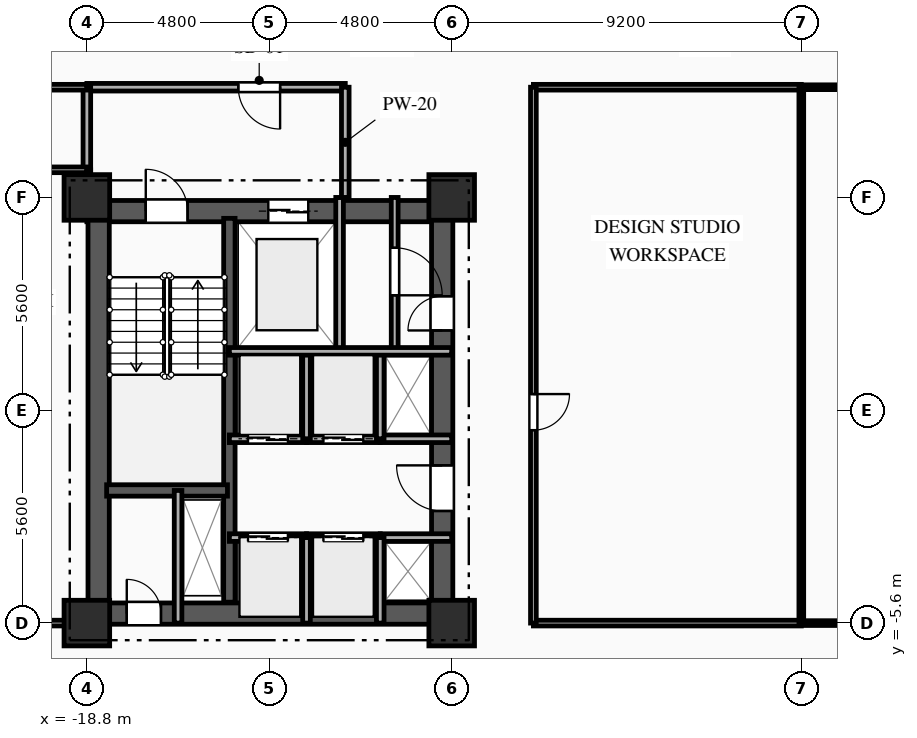
"""IFC4 building model, lengths in metres.
Left out: names, types, materials, properties, quantities, classifications, styles, units other than length and angle.
Written with IfcOpenShell. Run it as: python <this file> out.ifc"""

import sys

from ifc_helpers import new_model, si_unit, direction, frame, frame_2d, origin, origin_2d, place, context, subcontext, project, spatial, rectangle, extrude, element, fill, save


model = new_model("IFC4")
c1 = context("Model", 3, precision=1e-05, world=origin(), true_north=direction((0.0, 1.0)))
c2 = subcontext(c1, "Body", "Model", "MODEL_VIEW")
j1 = project(units=[si_unit("LENGTHUNIT", "METRE"), si_unit("PLANEANGLEUNIT", "RADIAN")], contexts=[c1])
p1 = place(None, origin())
s1 = spatial("IfcSite", under=j1, at=p1, CompositionType="ELEMENT")
p2 = place(p1, origin())
s2 = spatial("IfcBuilding", under=s1, at=p2, CompositionType="ELEMENT")
p3 = place(p2, frame((0.0, 0.0, 67.2)))
s3 = spatial("IfcBuildingStorey", under=s2, at=p3, CompositionType="ELEMENT", Elevation=67.2)
for number, where, z_axis, x_axis in (
    (1, (-18.8, -5.6, 0.0), (0.0, 0.0, 1.0), (1.0, 0.0, 0.0)),
    (2, (-18.8, 5.6, 0.0), (0.0, 0.0, 1.0), (1.0, 0.0, 0.0)),
    (3, (-9.2, -5.6, 0.0), (0.0, 0.0, 1.0), (1.0, 0.0, 0.0)),
    (4, (-9.2, 5.6, 0.0), (0.0, 0.0, 1.0), (1.0, 0.0, 0.0)),
):
    element("IfcColumn", number, at=place(p3, frame(where, z_axis=z_axis, x_axis=x_axis)), inside=s3, PredefinedType="COLUMN", context=c2, shape_type="SweptSolid", body=[
        extrude(rectangle(XDim=1.2, YDim=1.2, at=origin_2d()), origin(), (0.0, 0.0, 1.0), 3.35),
    ])
p4 = place(p3, frame((-18.8, 5.24, 0.0), z_axis=(0.0, 0.0, 1.0), x_axis=(1.0, 0.0, 0.0)))
e5 = element("IfcWall", 5, at=p4, inside=s3, PredefinedType="SHEAR", context=c2, shape_type="SweptSolid", body=[
    extrude(rectangle(XDim=9.6, YDim=0.56, at=frame_2d((4.8, 0.0))), origin(), (0.0, 0.0, 1.0), 3.035),
])
p5 = place(p4, frame((1.55, 0.0, 0.0)))
e6 = element("IfcOpeningElement", 6, at=p5, cuts=e5, PredefinedType="OPENING", context=c2, shape_type="SweptSolid", body=[
    extrude(rectangle(XDim=1.1, YDim=2.15, at=frame_2d((0.55, 1.075))), frame((0.0, 0.29, 0.0), z_axis=(0.0, -1.0, 0.0), x_axis=(1.0, 0.0, 0.0)), (0.0, 0.0, 1.0), 0.58),
])
p6 = place(p4, frame((4.775, 0.0, 0.0)))
e7 = element("IfcOpeningElement", 7, at=p6, cuts=e5, PredefinedType="OPENING", context=c2, shape_type="SweptSolid", body=[
    extrude(rectangle(XDim=1.05, YDim=2.1, at=frame_2d((0.525, 1.05))), frame((0.0, 0.29, 0.0), z_axis=(0.0, -1.0, 0.0), x_axis=(1.0, 0.0, 0.0)), (0.0, 0.0, 1.0), 0.58),
])
p7 = place(p3, frame((-18.8, -5.35, 0.0), z_axis=(0.0, 0.0, 1.0), x_axis=(1.0, 0.0, 0.0)))
e8 = element("IfcWall", 8, at=p7, inside=s3, PredefinedType="SHEAR", context=c2, shape_type="SweptSolid", body=[
    extrude(rectangle(XDim=9.6, YDim=0.56, at=frame_2d((4.8, 0.0))), origin(), (0.0, 0.0, 1.0), 3.035),
])
p8 = place(p7, frame((1.05, 0.0, 0.0)))
e9 = element("IfcOpeningElement", 9, at=p8, cuts=e8, PredefinedType="OPENING", context=c2, shape_type="SweptSolid", body=[
    extrude(rectangle(XDim=0.9, YDim=2.1, at=frame_2d((0.45, 1.05))), frame((0.0, 0.29, 0.0), z_axis=(0.0, -1.0, 0.0), x_axis=(1.0, 0.0, 0.0)), (0.0, 0.0, 1.0), 0.58),
])
p9 = place(p3, frame((-18.49, -5.05, 0.0), z_axis=(0.0, 0.0, 1.0), x_axis=(0.0, 1.0, 0.0)))
e10 = element("IfcWall", 10, at=p9, inside=s3, PredefinedType="SHEAR", context=c2, shape_type="SweptSolid", body=[
    extrude(rectangle(XDim=10.1, YDim=0.56, at=frame_2d((5.05, 0.0))), origin(), (0.0, 0.0, 1.0), 3.035),
])
p10 = place(p3, frame((-9.45, -5.05, 0.0), z_axis=(0.0, 0.0, 1.0), x_axis=(0.0, 1.0, 0.0)))
e11 = element("IfcWall", 11, at=p10, inside=s3, PredefinedType="SHEAR", context=c2, shape_type="SweptSolid", body=[
    extrude(rectangle(XDim=10.1, YDim=0.56, at=frame_2d((5.05, 0.0))), origin(), (0.0, 0.0, 1.0), 3.035),
])
p11 = place(p10, frame((7.15, 0.0, 0.0)))
e12 = element("IfcOpeningElement", 12, at=p11, cuts=e11, PredefinedType="OPENING", context=c2, shape_type="SweptSolid", body=[
    extrude(rectangle(XDim=0.9, YDim=2.1, at=frame_2d((0.45, 1.05))), frame((0.0, 0.29, 0.0), z_axis=(0.0, -1.0, 0.0), x_axis=(1.0, 0.0, 0.0)), (0.0, 0.0, 1.0), 0.58),
])
p12 = place(p10, frame((2.4, 0.0, 0.0)))
e13 = element("IfcOpeningElement", 13, at=p12, cuts=e11, PredefinedType="OPENING", context=c2, shape_type="SweptSolid", body=[
    extrude(rectangle(XDim=1.2, YDim=2.15, at=frame_2d((0.6, 1.075))), frame((0.0, 0.29, 0.0), z_axis=(0.0, -1.0, 0.0), x_axis=(1.0, 0.0, 0.0)), (0.0, 0.0, 1.0), 0.58),
])
p13 = place(p3, frame((-15.05, -5.05, 0.0), z_axis=(0.0, 0.0, 1.0), x_axis=(0.0, 1.0, 0.0)))
e14 = element("IfcWall", 14, at=p13, inside=s3, PredefinedType="SHEAR", context=c2, shape_type="SweptSolid", body=[
    extrude(rectangle(XDim=10.1, YDim=0.3, at=frame_2d((5.05, 0.0))), origin(), (0.0, 0.0, 1.0), 3.035),
])
p14 = place(p3, frame((-18.28, -2.11, 0.0), z_axis=(0.0, 0.0, 1.0), x_axis=(1.0, 0.0, 0.0)))
e15 = element("IfcWall", 15, at=p14, inside=s3, PredefinedType="SHEAR", context=c2, shape_type="SweptSolid", body=[
    extrude(rectangle(XDim=3.18, YDim=0.3, at=frame_2d((1.59, 0.0))), origin(), (0.0, 0.0, 1.0), 3.035),
])
p15 = place(p3, frame((-16.4, -5.6, 0.0), z_axis=(0.0, 0.0, 1.0), x_axis=(0.0, 1.0, 0.0)))
e16 = element("IfcWall", 16, at=p15, inside=s3, PredefinedType="PARTITIONING", context=c2, shape_type="SweptSolid", body=[
    extrude(rectangle(XDim=3.49, YDim=0.2, at=frame_2d((1.745, 0.0))), origin(), (0.0, 0.0, 1.0), 3.035),
])
p16 = place(p3, frame((-12.15, 1.55, 0.0), z_axis=(0.0, 0.0, 1.0), x_axis=(0.0, 1.0, 0.0)))
e17 = element("IfcWall", 17, at=p16, inside=s3, PredefinedType="PARTITIONING", context=c2, shape_type="SweptSolid", body=[
    extrude(rectangle(XDim=4.05, YDim=0.2, at=frame_2d((2.025, 0.0))), origin(), (0.0, 0.0, 1.0), 3.035),
])
p17 = place(p3, frame((-12.0, 8.5, 0.0), z_axis=(0.0, 0.0, 1.0), x_axis=(-1.0, 0.0, 0.0)))
e18 = element("IfcWall", 18, at=p17, inside=s3, PredefinedType="PARTITIONING", context=c2, shape_type="SweptSolid", body=[
    extrude(rectangle(XDim=6.8, YDim=0.2, at=frame_2d((3.4, 0.0))), origin(), (0.0, 0.0, 1.0), 3.035),
])
p18 = place(p17, frame((1.715, 0.0, 0.0)))
e19 = element("IfcOpeningElement", 19, at=p18, cuts=e18, PredefinedType="OPENING", context=c2, shape_type="SweptSolid", body=[
    extrude(rectangle(XDim=1.1, YDim=2.15, at=frame_2d((0.55, 1.075))), frame((0.0, 0.11, 0.0), z_axis=(0.0, -1.0, 0.0), x_axis=(1.0, 0.0, 0.0)), (0.0, 0.0, 1.0), 0.22),
])
p19 = place(p3, frame((-12.0, 5.6, 0.0), z_axis=(0.0, 0.0, 1.0), x_axis=(0.0, 1.0, 0.0)))
e20 = element("IfcWall", 20, at=p19, inside=s3, PredefinedType="PARTITIONING", context=c2, shape_type="SweptSolid", body=[
    extrude(rectangle(XDim=2.9, YDim=0.2, at=frame_2d((1.45, 0.0))), origin(), (0.0, 0.0, 1.0), 3.035),
])
p20 = place(p3, frame((-18.8, 6.327, 0.0), z_axis=(0.0, 0.0, 1.0), x_axis=(0.0, -1.0, 0.0)))
e21 = element("IfcWall", 21, at=p20, inside=s3, PredefinedType="PARTITIONING", context=c2, shape_type="SweptSolid", body=[
    extrude(rectangle(XDim=0.727, YDim=0.2, at=frame_2d((0.363, 0.0))), origin(), (0.0, 0.0, 1.0), 2.52),
])
p21 = place(p3, frame((-18.8, 8.5, 0.0), z_axis=(0.0, 0.0, 1.0), x_axis=(0.0, -1.0, 0.0)))
e22 = element("IfcWall", 22, at=p21, inside=s3, PredefinedType="PARTITIONING", context=c2, shape_type="SweptSolid", body=[
    extrude(rectangle(XDim=2.173, YDim=0.2, at=frame_2d((1.086, 0.0))), origin(), (0.0, 0.0, 1.0), 2.52),
])
p22 = place(p3, frame((-10.7, 5.6, 0.0), z_axis=(0.0, 0.0, 1.0), x_axis=(0.0, -1.0, 0.0)))
e23 = element("IfcWall", 23, at=p22, inside=s3, PredefinedType="PARTITIONING", context=c2, shape_type="SweptSolid", body=[
    extrude(rectangle(XDim=4.05, YDim=0.18, at=frame_2d((2.025, 0.0))), origin(), (0.0, 0.0, 1.0), 3.035),
])
p23 = place(p22, frame((1.325, 0.0, 0.0)))
e24 = element("IfcOpeningElement", 24, at=p23, cuts=e23, PredefinedType="OPENING", context=c2, shape_type="SweptSolid", body=[
    extrude(rectangle(XDim=1.25, YDim=2.2, at=frame_2d((0.625, 1.1))), frame((0.0, 0.1, 0.0), z_axis=(0.0, -1.0, 0.0), x_axis=(1.0, 0.0, 0.0)), (0.0, 0.0, 1.0), 0.2),
])
p24 = place(p3, frame((-15.05, -3.35, 0.0), z_axis=(0.0, 0.0, 1.0), x_axis=(1.0, 0.0, 0.0)))
e25 = element("IfcWall", 25, at=p24, inside=s3, PredefinedType="PARTITIONING", context=c2, shape_type="SweptSolid", body=[
    extrude(rectangle(XDim=2.03, YDim=0.2, at=frame_2d((1.015, 0.0))), origin(), (0.0, 0.0, 1.0), 3.035),
])
p25 = place(p24, frame((0.49, 0.0, 0.0)))
e26 = element("IfcOpeningElement", 26, at=p25, cuts=e25, PredefinedType="OPENING", context=c2, shape_type="SweptSolid", body=[
    extrude(rectangle(XDim=1.05, YDim=2.1, at=frame_2d((0.525, 1.05))), frame((0.0, 0.11, 0.0), z_axis=(0.0, -1.0, 0.0), x_axis=(1.0, 0.0, 0.0)), (0.0, 0.0, 1.0), 0.22),
])
p26 = place(p3, frame((-13.02, -3.35, 0.0), z_axis=(0.0, 0.0, 1.0), x_axis=(1.0, 0.0, 0.0)))
e27 = element("IfcWall", 27, at=p26, inside=s3, PredefinedType="PARTITIONING", context=c2, shape_type="SweptSolid", body=[
    extrude(rectangle(XDim=1.94, YDim=0.2, at=frame_2d((0.97, 0.0))), origin(), (0.0, 0.0, 1.0), 3.035),
])
p27 = place(p26, frame((0.445, 0.0, 0.0)))
e28 = element("IfcOpeningElement", 28, at=p27, cuts=e27, PredefinedType="OPENING", context=c2, shape_type="SweptSolid", body=[
    extrude(rectangle(XDim=1.05, YDim=2.1, at=frame_2d((0.525, 1.05))), frame((0.0, 0.11, 0.0), z_axis=(0.0, -1.0, 0.0), x_axis=(1.0, 0.0, 0.0)), (0.0, 0.0, 1.0), 0.22),
])
p28 = place(p3, frame((-11.08, -3.35, 0.0), z_axis=(0.0, 0.0, 1.0), x_axis=(1.0, 0.0, 0.0)))
e29 = element("IfcWall", 29, at=p28, inside=s3, PredefinedType="PARTITIONING", context=c2, shape_type="SweptSolid", body=[
    extrude(rectangle(XDim=1.88, YDim=0.2, at=frame_2d((0.94, 0.0))), origin(), (0.0, 0.0, 1.0), 2.75),
])
p29 = place(p3, frame((-13.02, -0.75, 0.0), z_axis=(0.0, 0.0, 1.0), x_axis=(-1.0, 0.0, 0.0)))
e30 = element("IfcWall", 30, at=p29, inside=s3, PredefinedType="PARTITIONING", context=c2, shape_type="SweptSolid", body=[
    extrude(rectangle(XDim=2.03, YDim=0.2, at=frame_2d((1.015, 0.0))), origin(), (0.0, 0.0, 1.0), 3.035),
])
p30 = place(p29, frame((0.49, 0.0, 0.0)))
e31 = element("IfcOpeningElement", 31, at=p30, cuts=e30, PredefinedType="OPENING", context=c2, shape_type="SweptSolid", body=[
    extrude(rectangle(XDim=1.05, YDim=2.1, at=frame_2d((0.525, 1.05))), frame((0.0, 0.11, 0.0), z_axis=(0.0, -1.0, 0.0), x_axis=(1.0, 0.0, 0.0)), (0.0, 0.0, 1.0), 0.22),
])
p31 = place(p3, frame((-11.08, -0.75, 0.0), z_axis=(0.0, 0.0, 1.0), x_axis=(-1.0, 0.0, 0.0)))
e32 = element("IfcWall", 32, at=p31, inside=s3, PredefinedType="PARTITIONING", context=c2, shape_type="SweptSolid", body=[
    extrude(rectangle(XDim=1.94, YDim=0.2, at=frame_2d((0.97, 0.0))), origin(), (0.0, 0.0, 1.0), 3.035),
])
p32 = place(p31, frame((0.445, 0.0, 0.0)))
e33 = element("IfcOpeningElement", 33, at=p32, cuts=e32, PredefinedType="OPENING", context=c2, shape_type="SweptSolid", body=[
    extrude(rectangle(XDim=1.05, YDim=2.1, at=frame_2d((0.525, 1.05))), frame((0.0, 0.11, 0.0), z_axis=(0.0, -1.0, 0.0), x_axis=(1.0, 0.0, 0.0)), (0.0, 0.0, 1.0), 0.22),
])
p33 = place(p3, frame((-9.2, -0.75, 0.0), z_axis=(0.0, 0.0, 1.0), x_axis=(-1.0, 0.0, 0.0)))
e34 = element("IfcWall", 34, at=p33, inside=s3, PredefinedType="PARTITIONING", context=c2, shape_type="SweptSolid", body=[
    extrude(rectangle(XDim=1.88, YDim=0.2, at=frame_2d((0.94, 0.0))), origin(), (0.0, 0.0, 1.0), 3.035),
])
for number, where, z_axis, x_axis in (
    (35, (-13.02, -5.6, 0.0), (0.0, 0.0, 1.0), (0.0, 1.0, 0.0)),
    (36, (-11.08, -5.6, 0.0), (0.0, 0.0, 1.0), (0.0, 1.0, 0.0)),
):
    element("IfcWall", number, at=place(p3, frame(where, z_axis=z_axis, x_axis=x_axis)), inside=s3, PredefinedType="PARTITIONING", context=c2, shape_type="SweptSolid", body=[
        extrude(rectangle(XDim=2.25, YDim=0.2, at=frame_2d((1.125, 0.0))), origin(), (0.0, 0.0, 1.0), 3.035),
    ])
for number, where, z_axis, x_axis in (
    (37, (-13.02, -0.75, 0.0), (0.0, 0.0, 1.0), (0.0, 1.0, 0.0)),
    (38, (-11.08, -0.75, 0.0), (0.0, 0.0, 1.0), (0.0, 1.0, 0.0)),
):
    element("IfcWall", number, at=place(p3, frame(where, z_axis=z_axis, x_axis=x_axis)), inside=s3, PredefinedType="PARTITIONING", context=c2, shape_type="SweptSolid", body=[
        extrude(rectangle(XDim=2.3, YDim=0.2, at=frame_2d((1.15, 0.0))), origin(), (0.0, 0.0, 1.0), 3.035),
    ])
p34 = place(p3, frame((-18.8, 8.5, 0.0), z_axis=(0.0, 0.0, 1.0), x_axis=(-1.0, 0.0, 0.0)))
e39 = element("IfcWall", 39, at=p34, inside=s3, PredefinedType="PARTITIONING", context=c2, shape_type="SweptSolid", body=[
    extrude(rectangle(XDim=4.2, YDim=0.15, at=frame_2d((2.1, 0.0))), origin(), (0.0, 0.0, 1.0), 3.035),
])
p35 = place(p34, frame((2.321, 0.0, 0.0)))
e40 = element("IfcOpeningElement", 40, at=p35, cuts=e39, PredefinedType="OPENING", context=c2, shape_type="SweptSolid", body=[
    extrude(rectangle(XDim=1.05, YDim=2.15, at=frame_2d((0.525, 1.075))), frame((0.0, 0.085, 0.0), z_axis=(0.0, -1.0, 0.0), x_axis=(1.0, 0.0, 0.0)), (0.0, 0.0, 1.0), 0.17),
])
p36 = place(p3, frame((0.0, 8.5, 0.0), z_axis=(0.0, 0.0, 1.0), x_axis=(-1.0, 0.0, 0.0)))
e41 = element("IfcWall", 41, at=p36, inside=s3, PredefinedType="PARTITIONING", context=c2, shape_type="SweptSolid", body=[
    extrude(rectangle(XDim=7.05, YDim=0.15, at=frame_2d((3.525, 0.0))), origin(), (0.0, 0.0, 1.0), 3.035),
])
p37 = place(p3, frame((7.05, 8.5, 0.0), z_axis=(0.0, 0.0, 1.0), x_axis=(-1.0, 0.0, 0.0)))
e42 = element("IfcWall", 42, at=p37, inside=s3, PredefinedType="PARTITIONING", context=c2, shape_type="SweptSolid", body=[
    extrude(rectangle(XDim=7.05, YDim=0.125, at=frame_2d((3.525, 0.0))), origin(), (0.0, 0.0, 1.0), 3.035),
])
p38 = place(p3, frame((-23.0, -5.6, 0.0), z_axis=(0.0, 0.0, 1.0), x_axis=(1.0, 0.0, 0.0)))
e43 = element("IfcWall", 43, at=p38, inside=s3, PredefinedType="PARTITIONING", context=c2, shape_type="SweptSolid", body=[
    extrude(rectangle(XDim=4.2, YDim=0.15, at=frame_2d((2.1, 0.0))), origin(), (0.0, 0.0, 1.0), 3.035),
])
p39 = place(p38, frame((0.829, 0.0, 0.0)))
e44 = element("IfcOpeningElement", 44, at=p39, cuts=e43, PredefinedType="OPENING", context=c2, shape_type="SweptSolid", body=[
    extrude(rectangle(XDim=1.05, YDim=2.15, at=frame_2d((0.525, 1.075))), frame((0.0, 0.085, 0.0), z_axis=(0.0, -1.0, 0.0), x_axis=(1.0, 0.0, 0.0)), (0.0, 0.0, 1.0), 0.17),
])
p40 = place(p3, frame((-7.05, -5.6, 0.0), z_axis=(0.0, 0.0, 1.0), x_axis=(1.0, 0.0, 0.0)))
e45 = element("IfcWall", 45, at=p40, inside=s3, PredefinedType="PARTITIONING", context=c2, shape_type="SweptSolid", body=[
    extrude(rectangle(XDim=7.05, YDim=0.15, at=frame_2d((3.525, 0.0))), origin(), (0.0, 0.0, 1.0), 2.52),
])
p41 = place(p3, frame((0.0, -5.6, 0.0), z_axis=(0.0, 0.0, 1.0), x_axis=(1.0, 0.0, 0.0)))
e46 = element("IfcWall", 46, at=p41, inside=s3, PredefinedType="PARTITIONING", context=c2, shape_type="SweptSolid", body=[
    extrude(rectangle(XDim=7.05, YDim=0.125, at=frame_2d((3.525, 0.0))), origin(), (0.0, 0.0, 1.0), 2.52),
])
p42 = place(p3, frame((-7.05, 8.5, 0.0), z_axis=(0.0, 0.0, 1.0), x_axis=(0.0, -1.0, 0.0)))
e47 = element("IfcWall", 47, at=p42, inside=s3, PredefinedType="PARTITIONING", context=c2, shape_type="SweptSolid", body=[
    extrude(rectangle(XDim=14.1, YDim=0.15, at=frame_2d((7.05, 0.0))), origin(), (0.0, 0.0, 1.0), 3.035),
])
p43 = place(p42, frame((8.074, 0.0, 0.0)))
e48 = element("IfcOpeningElement", 48, at=p43, cuts=e47, PredefinedType="OPENING", context=c2, shape_type="SweptSolid", body=[
    extrude(rectangle(XDim=0.95, YDim=2.1, at=frame_2d((0.475, 1.05))), frame((0.0, 0.085, 0.0), z_axis=(0.0, -1.0, 0.0), x_axis=(1.0, 0.0, 0.0)), (0.0, 0.0, 1.0), 0.17),
])
p44 = place(p3, frame((-25.59, 6.327, 0.0), z_axis=(0.0, 0.0, 1.0), x_axis=(1.0, 0.0, 0.0)))
e49 = element("IfcWall", 49, at=p44, inside=s3, PredefinedType="PARTITIONING", context=c2, shape_type="SweptSolid", body=[
    extrude(rectangle(XDim=6.79, YDim=0.15, at=frame_2d((3.395, 0.0))), origin(), (0.0, 0.0, 1.0), 3.035),
])
p45 = place(p3, frame((0.0, 8.5, 0.0), z_axis=(0.0, 0.0, 1.0), x_axis=(0.0, -1.0, 0.0)))
e50 = element("IfcWall", 50, at=p45, inside=s3, PredefinedType="PARTITIONING", context=c2, shape_type="SweptSolid", body=[
    extrude(rectangle(XDim=14.1, YDim=0.125, at=frame_2d((7.05, 0.0))), origin(), (0.0, 0.0, 1.0), 3.035),
])
p46 = place(p3, frame((-15.05, 1.55, 0.0), z_axis=(0.0, 0.0, 1.0), x_axis=(1.0, 0.0, 0.0)))
e51 = element("IfcWall", 51, at=p46, inside=s3, PredefinedType="PARTITIONING", context=c2, shape_type="SweptSolid", body=[
    extrude(rectangle(XDim=5.85, YDim=0.2, at=frame_2d((2.925, 0.0))), origin(), (0.0, 0.0, 1.0), 3.035),
])
p47 = place(p5, origin())
e52 = element("IfcDoor", 52, at=p47, inside=s3, OperationType="SINGLE_SWING_LEFT", PredefinedType="DOOR", context=c2, shape_type="SweptSolid", body=[
    extrude(rectangle(XDim=1.1, YDim=2.15, at=frame_2d((0.55, 1.075))), frame((0.0, 0.025, 0.0), z_axis=(0.0, -1.0, 0.0), x_axis=(1.0, 0.0, 0.0)), (0.0, 0.0, 1.0), 0.05),
])
fill(e6, e52)
p48 = place(p6, origin())
e53 = element("IfcDoor", 53, at=p48, inside=s3, OperationType="DOUBLE_DOOR_SLIDING", PredefinedType="DOOR", context=c2, shape_type="SweptSolid", body=[
    extrude(rectangle(XDim=1.05, YDim=2.1, at=frame_2d((0.525, 1.05))), frame((0.0, 0.025, 0.0), z_axis=(0.0, -1.0, 0.0), x_axis=(1.0, 0.0, 0.0)), (0.0, 0.0, 1.0), 0.05),
])
fill(e7, e53)
p49 = place(p8, origin())
e54 = element("IfcDoor", 54, at=p49, inside=s3, OperationType="SINGLE_SWING_LEFT", PredefinedType="DOOR", context=c2, shape_type="SweptSolid", body=[
    extrude(rectangle(XDim=0.9, YDim=2.1, at=frame_2d((0.45, 1.05))), frame((0.0, 0.025, 0.0), z_axis=(0.0, -1.0, 0.0), x_axis=(1.0, 0.0, 0.0)), (0.0, 0.0, 1.0), 0.05),
])
fill(e9, e54)
p50 = place(p18, origin())
e55 = element("IfcDoor", 55, at=p50, inside=s3, OperationType="SINGLE_SWING_LEFT", PredefinedType="DOOR", context=c2, shape_type="SweptSolid", body=[
    extrude(rectangle(XDim=1.1, YDim=2.15, at=frame_2d((0.55, 1.075))), frame((0.0, 0.025, 0.0), z_axis=(0.0, -1.0, 0.0), x_axis=(1.0, 0.0, 0.0)), (0.0, 0.0, 1.0), 0.05),
])
fill(e19, e55)
p51 = place(p23, origin())
e56 = element("IfcDoor", 56, at=p51, inside=s3, OperationType="SINGLE_SWING_RIGHT", PredefinedType="DOOR", context=c2, shape_type="SweptSolid", body=[
    extrude(rectangle(XDim=1.25, YDim=2.2, at=frame_2d((0.625, 1.1))), frame((0.0, 0.025, 0.0), z_axis=(0.0, -1.0, 0.0), x_axis=(1.0, 0.0, 0.0)), (0.0, 0.0, 1.0), 0.05),
])
fill(e24, e56)
p52 = place(p11, origin())
e57 = element("IfcDoor", 57, at=p52, inside=s3, OperationType="SINGLE_SWING_LEFT", PredefinedType="DOOR", context=c2, shape_type="SweptSolid", body=[
    extrude(rectangle(XDim=0.9, YDim=2.1, at=frame_2d((0.45, 1.05))), frame((0.0, 0.025, 0.0), z_axis=(0.0, -1.0, 0.0), x_axis=(1.0, 0.0, 0.0)), (0.0, 0.0, 1.0), 0.05),
])
fill(e12, e57)
p53 = place(p25, origin())
e58 = element("IfcDoor", 58, at=p53, inside=s3, OperationType="DOUBLE_DOOR_SLIDING", PredefinedType="DOOR", context=c2, shape_type="SweptSolid", body=[
    extrude(rectangle(XDim=1.05, YDim=2.1, at=frame_2d((0.525, 1.05))), frame((0.0, 0.025, 0.0), z_axis=(0.0, -1.0, 0.0), x_axis=(1.0, 0.0, 0.0)), (0.0, 0.0, 1.0), 0.05),
])
fill(e26, e58)
p54 = place(p27, origin())
e59 = element("IfcDoor", 59, at=p54, inside=s3, OperationType="DOUBLE_DOOR_SLIDING", PredefinedType="DOOR", context=c2, shape_type="SweptSolid", body=[
    extrude(rectangle(XDim=1.05, YDim=2.1, at=frame_2d((0.525, 1.05))), frame((0.0, 0.025, 0.0), z_axis=(0.0, -1.0, 0.0), x_axis=(1.0, 0.0, 0.0)), (0.0, 0.0, 1.0), 0.05),
])
fill(e28, e59)
p55 = place(p30, origin())
e60 = element("IfcDoor", 60, at=p55, inside=s3, OperationType="DOUBLE_DOOR_SLIDING", PredefinedType="DOOR", context=c2, shape_type="SweptSolid", body=[
    extrude(rectangle(XDim=1.05, YDim=2.1, at=frame_2d((0.525, 1.05))), frame((0.0, 0.025, 0.0), z_axis=(0.0, -1.0, 0.0), x_axis=(1.0, 0.0, 0.0)), (0.0, 0.0, 1.0), 0.05),
])
fill(e31, e60)
p56 = place(p32, origin())
e61 = element("IfcDoor", 61, at=p56, inside=s3, OperationType="DOUBLE_DOOR_SLIDING", PredefinedType="DOOR", context=c2, shape_type="SweptSolid", body=[
    extrude(rectangle(XDim=1.05, YDim=2.1, at=frame_2d((0.525, 1.05))), frame((0.0, 0.025, 0.0), z_axis=(0.0, -1.0, 0.0), x_axis=(1.0, 0.0, 0.0)), (0.0, 0.0, 1.0), 0.05),
])
fill(e33, e61)
p57 = place(p12, origin())
e62 = element("IfcDoor", 62, at=p57, inside=s3, OperationType="SINGLE_SWING_RIGHT", PredefinedType="DOOR", context=c2, shape_type="SweptSolid", body=[
    extrude(rectangle(XDim=1.2, YDim=2.15, at=frame_2d((0.6, 1.075))), frame((0.0, 0.025, 0.0), z_axis=(0.0, -1.0, 0.0), x_axis=(1.0, 0.0, 0.0)), (0.0, 0.0, 1.0), 0.05),
])
fill(e13, e62)
p58 = place(p43, origin())
e63 = element("IfcDoor", 63, at=p58, inside=s3, OperationType="SINGLE_SWING_LEFT", PredefinedType="DOOR", context=c2, shape_type="SweptSolid", body=[
    extrude(rectangle(XDim=0.95, YDim=2.1, at=frame_2d((0.475, 1.05))), frame((0.0, 0.025, 0.0), z_axis=(0.0, -1.0, 0.0), x_axis=(1.0, 0.0, 0.0)), (0.0, 0.0, 1.0), 0.05),
])
fill(e48, e63)
save(model, sys.argv[1])
